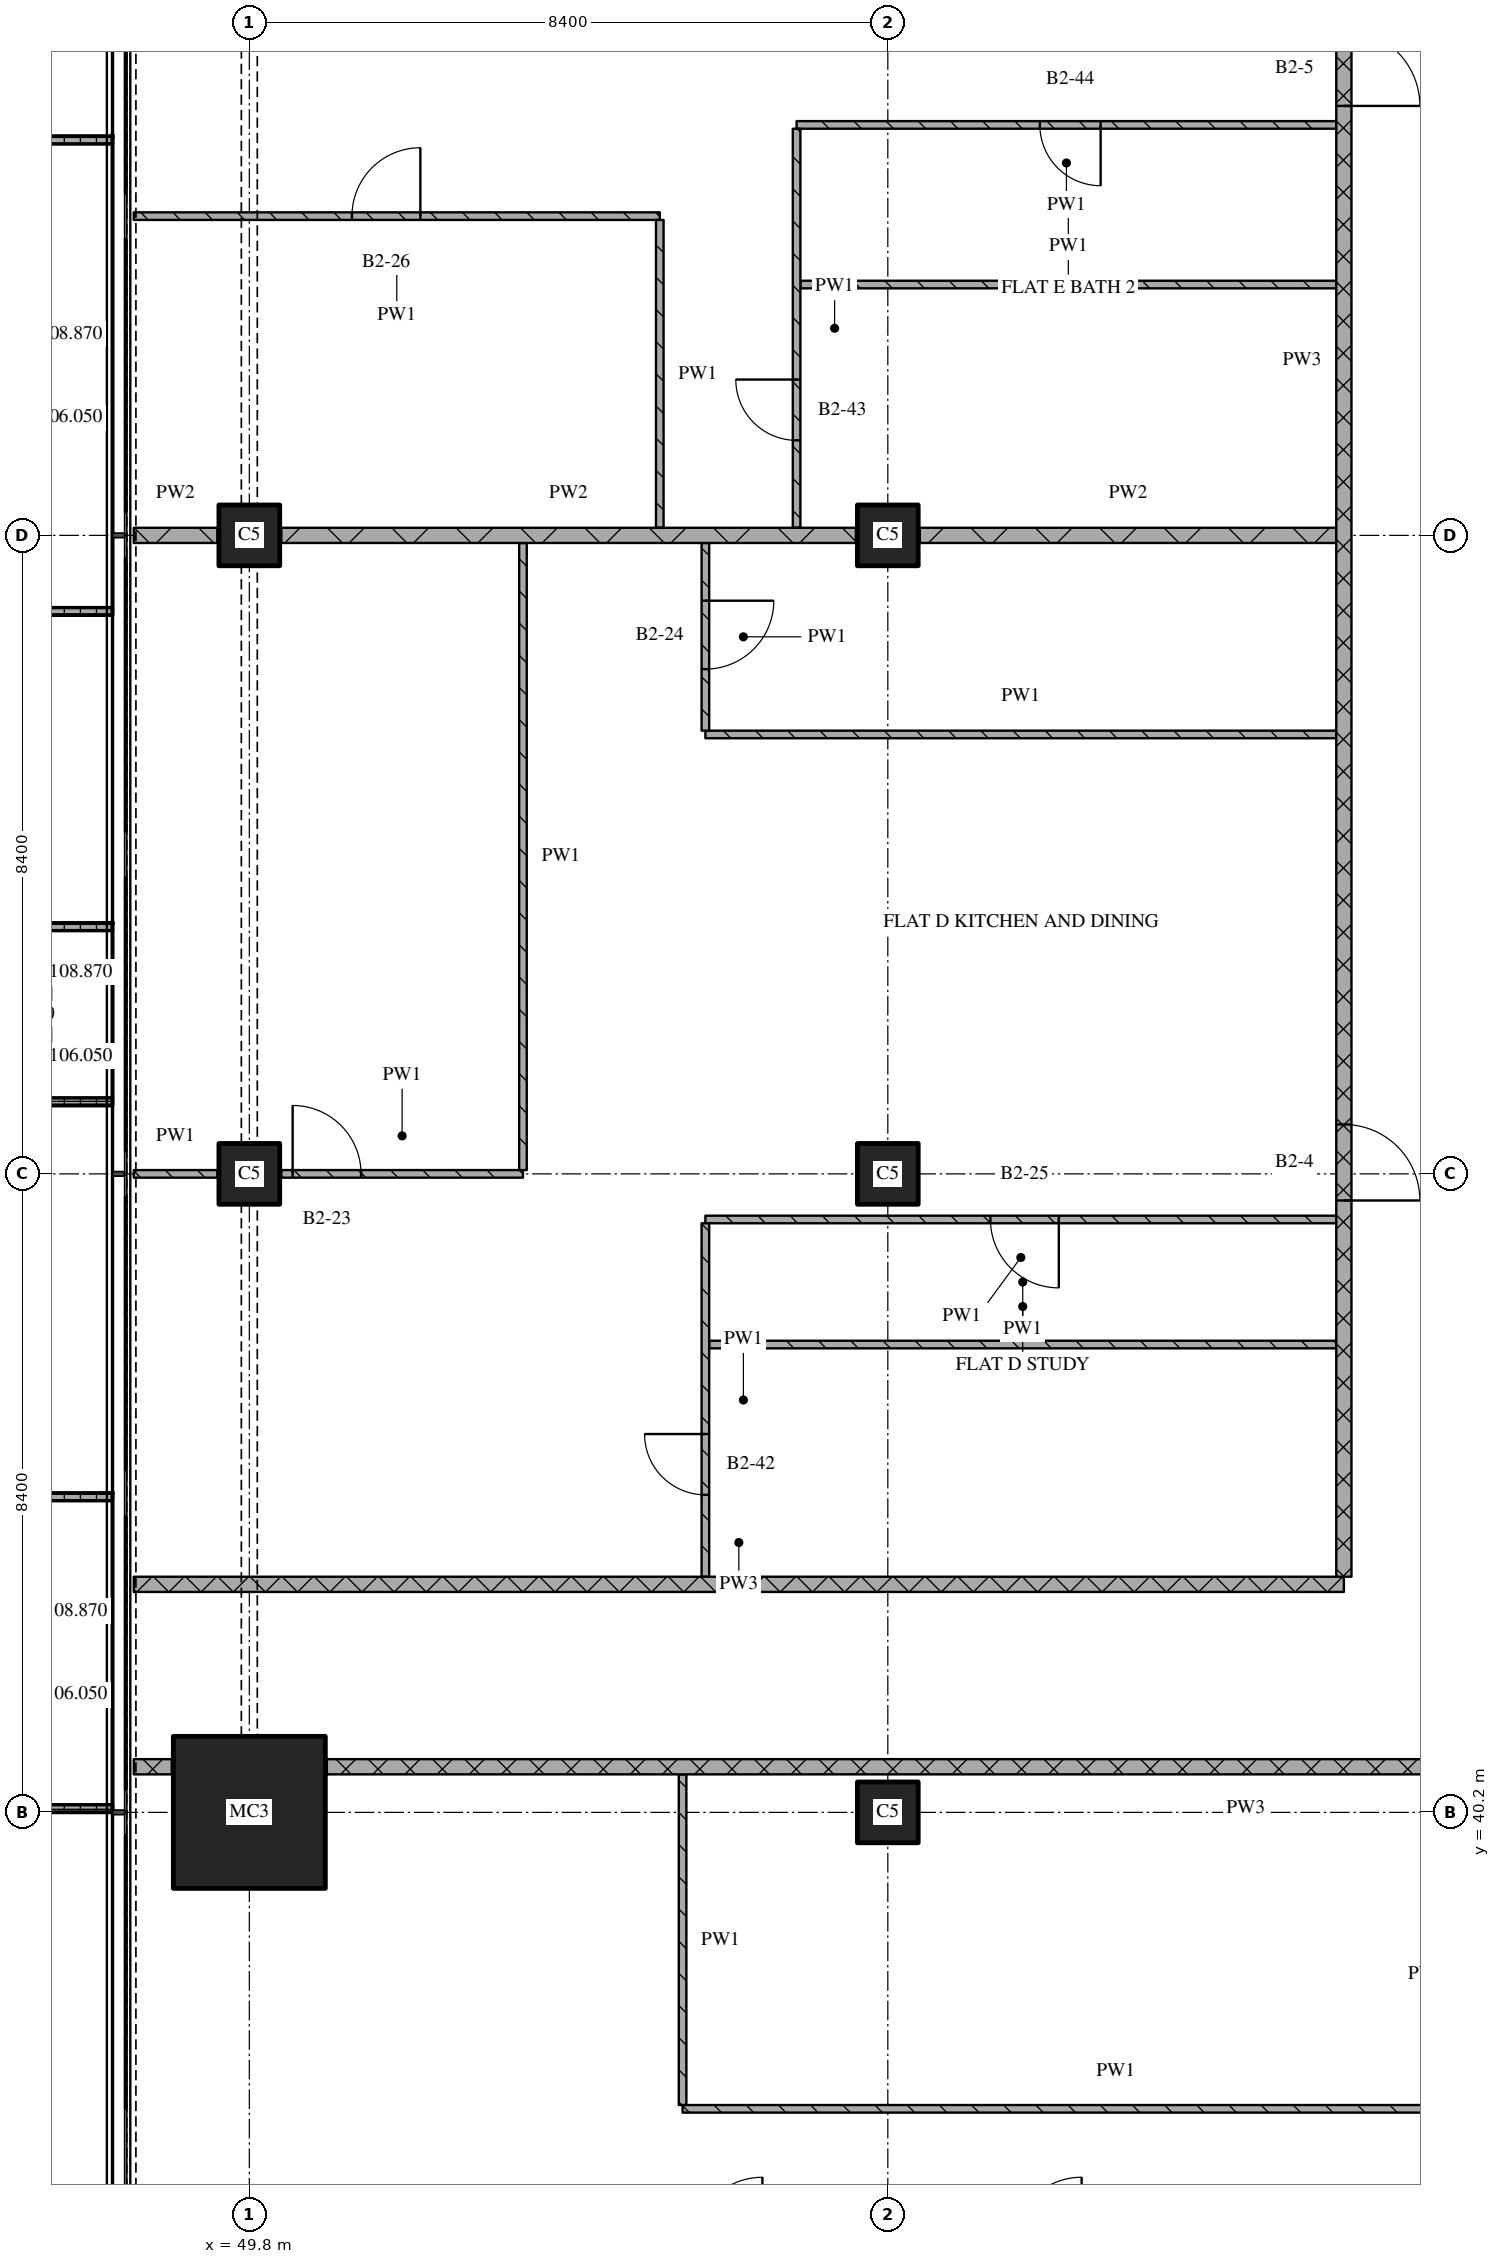
"""IFC4 building model, lengths in metres.
Left out: names, types, materials, properties, quantities, classifications, styles, units other than length and angle.
Written with IfcOpenShell. Run it as: python <this file> out.ifc"""

import sys

from ifc_helpers import new_model, si_unit, direction, frame, frame_2d, origin, origin_2d, place, context, subcontext, project, spatial, polyline, rectangle, outline, extrude, element, fill, save


model = new_model("IFC4")
c1 = context("Model", 3, precision=1e-05, world=origin(), true_north=direction((0.0, 1.0)))
c2 = subcontext(c1, "Body", "Model", "MODEL_VIEW")
j1 = project(units=[si_unit("LENGTHUNIT", "METRE"), si_unit("PLANEANGLEUNIT", "RADIAN")], contexts=[c1])
p1 = place(None, origin())
s1 = spatial("IfcSite", under=j1, at=p1, CompositionType="ELEMENT")
p2 = place(p1, origin())
s2 = spatial("IfcBuilding", under=s1, at=p2, CompositionType="ELEMENT")
p3 = place(p2, frame((0.0, 0.0, 106.05)))
s3 = spatial("IfcBuildingStorey", under=s2, at=p3, CompositionType="ELEMENT", Elevation=106.05)
p4 = place(p3, frame((49.8, 40.2, 0.0), z_axis=(0.0, 0.0, 1.0), x_axis=(1.0, 0.0, 0.0)))
e1 = element("IfcColumn", 1, at=p4, inside=s3, PredefinedType="COLUMN", context=c2, shape_type="SweptSolid", body=[
    extrude(rectangle(XDim=2.0, YDim=2.0, at=origin_2d()), origin(), (0.0, 0.0, 1.0), 3.6),
])
for number, where, z_axis, x_axis in (
    (2, (49.8, 48.6, 0.0), (0.0, 0.0, 1.0), (1.0, 0.0, 0.0)),
    (3, (49.8, 57.0, 0.0), (0.0, 0.0, 1.0), (1.0, 0.0, 0.0)),
    (4, (58.2, 40.2, 0.0), (0.0, 0.0, 1.0), (1.0, 0.0, 0.0)),
    (5, (58.2, 48.6, 0.0), (0.0, 0.0, 1.0), (1.0, 0.0, 0.0)),
    (6, (58.2, 57.0, 0.0), (0.0, 0.0, 1.0), (1.0, 0.0, 0.0)),
):
    element("IfcColumn", number, at=place(p3, frame(where, z_axis=z_axis, x_axis=x_axis)), inside=s3, PredefinedType="COLUMN", context=c2, shape_type="SweptSolid", body=[
        extrude(rectangle(XDim=0.8, YDim=0.8, at=origin_2d()), origin(), (0.0, 0.0, 1.0), 3.6),
    ])
p5 = place(p3, origin())
e7 = element("IfcWall", 7, at=p5, inside=s3, PredefinedType="SOLIDWALL", context=c2, shape_type="SweptSolid", body=[
    extrude(outline(polyline([(48.0, 62.25), (48.0, 62.15), (46.233, 62.15), (46.233, 56.05), (48.0, 56.05), (48.0, 55.95), (46.133, 55.95), (46.133, 62.25), (48.0, 62.25)])), origin(), (0.0, 0.0, 1.0), 1.0),
])
p6 = place(p3, origin())
e8 = element("IfcWall", 8, at=p6, inside=s3, PredefinedType="SOLIDWALL", context=c2, shape_type="SweptSolid", body=[
    extrude(outline(polyline([(48.0, 51.9), (48.0, 51.8), (46.5, 51.8), (46.5, 49.6), (48.0, 49.6), (48.0, 49.5), (46.4, 49.5), (46.4, 51.9), (48.0, 51.9)])), origin(), (0.0, 0.0, 1.0), 1.0),
])
p7 = place(p3, origin())
e9 = element("IfcWall", 9, at=p7, inside=s3, PredefinedType="SOLIDWALL", context=c2, shape_type="SweptSolid", body=[
    extrude(outline(polyline([(48.0, 44.4), (48.0, 44.3), (46.367, 44.3), (46.367, 40.3), (48.0, 40.3), (48.0, 40.2), (46.267, 40.2), (46.267, 44.4), (48.0, 44.4)])), origin(), (0.0, 0.0, 1.0), 1.0),
])
p8 = place(p3, frame((55.5, 36.3, 0.0), z_axis=(0.0, 0.0, 1.0), x_axis=(1.0, 0.0, 0.0)))
e10 = element("IfcWall", 10, at=p8, inside=s3, PredefinedType="PARTITIONING", context=c2, shape_type="SweptSolid", body=[
    extrude(rectangle(XDim=11.4, YDim=0.1, at=frame_2d((5.7, 0.0))), origin(), (0.0, 0.0, 1.0), 3.32),
])
p9 = place(p3, frame((48.28, 40.8, 0.0), z_axis=(0.0, 0.0, 1.0), x_axis=(1.0, 0.0, 0.0)))
e11 = element("IfcWall", 11, at=p9, inside=s3, PredefinedType="PARTITIONING", context=c2, shape_type="SweptSolid", body=[
    extrude(rectangle(XDim=0.5, YDim=0.2, at=frame_2d((0.25, 0.0))), origin(), (0.0, 0.0, 1.0), 3.32),
])
p10 = place(p3, frame((75.0, 40.8, 0.0), z_axis=(0.0, 0.0, 1.0), x_axis=(-1.0, 0.0, 0.0)))
e12 = element("IfcWall", 12, at=p10, inside=s3, PredefinedType="PARTITIONING", context=c2, shape_type="SweptSolid", body=[
    extrude(rectangle(XDim=24.18, YDim=0.2, at=frame_2d((12.09, 0.0))), origin(), (0.0, 0.0, 1.0), 3.32),
])
p11 = place(p10, frame((6.85, 0.0, 0.0)))
e13 = element("IfcOpeningElement", 13, at=p11, cuts=e12, PredefinedType="OPENING", context=c2, shape_type="SweptSolid", body=[
    extrude(rectangle(XDim=1.0, YDim=2.1, at=frame_2d((0.5, 1.05))), frame((0.0, 0.11, 0.0), z_axis=(0.0, -1.0, 0.0), x_axis=(1.0, 0.0, 0.0)), (0.0, 0.0, 1.0), 0.22),
])
p12 = place(p3, frame((48.28, 43.2, 0.0), z_axis=(0.0, 0.0, 1.0), x_axis=(1.0, 0.0, 0.0)))
e14 = element("IfcWall", 14, at=p12, inside=s3, PredefinedType="PARTITIONING", context=c2, shape_type="SweptSolid", body=[
    extrude(rectangle(XDim=15.92, YDim=0.2, at=frame_2d((7.96, 0.0))), origin(), (0.0, 0.0, 1.0), 3.32),
])
p13 = place(p3, frame((55.85, 46.355, 0.0), z_axis=(0.0, 0.0, 1.0), x_axis=(1.0, 0.0, 0.0)))
e15 = element("IfcWall", 15, at=p13, inside=s3, PredefinedType="PARTITIONING", context=c2, shape_type="SweptSolid", body=[
    extrude(rectangle(XDim=8.25, YDim=0.1, at=frame_2d((4.125, 0.0))), origin(), (0.0, 0.0, 1.0), 3.32),
])
p14 = place(p3, frame((64.1, 48.0, 0.0), z_axis=(0.0, 0.0, 1.0), x_axis=(-1.0, 0.0, 0.0)))
e16 = element("IfcWall", 16, at=p14, inside=s3, PredefinedType="PARTITIONING", context=c2, shape_type="SweptSolid", body=[
    extrude(rectangle(XDim=8.3, YDim=0.1, at=frame_2d((4.15, 0.0))), origin(), (0.0, 0.0, 1.0), 3.32),
])
p15 = place(p14, frame((3.65, 0.0, 0.0)))
e17 = element("IfcOpeningElement", 17, at=p15, cuts=e16, PredefinedType="OPENING", context=c2, shape_type="SweptSolid", body=[
    extrude(rectangle(XDim=0.9, YDim=2.1, at=frame_2d((0.45, 1.05))), frame((0.0, 0.06, 0.0), z_axis=(0.0, -1.0, 0.0), x_axis=(1.0, 0.0, 0.0)), (0.0, 0.0, 1.0), 0.12),
])
p16 = place(p3, frame((48.28, 48.6, 0.0), z_axis=(0.0, 0.0, 1.0), x_axis=(1.0, 0.0, 0.0)))
e18 = element("IfcWall", 18, at=p16, inside=s3, PredefinedType="PARTITIONING", context=c2, shape_type="SweptSolid", body=[
    extrude(rectangle(XDim=1.1, YDim=0.1, at=frame_2d((0.55, 0.0))), origin(), (0.0, 0.0, 1.0), 3.32),
])
p17 = place(p3, frame((50.22, 48.6, 0.0), z_axis=(0.0, 0.0, 1.0), x_axis=(1.0, 0.0, 0.0)))
e19 = element("IfcWall", 19, at=p17, inside=s3, PredefinedType="PARTITIONING", context=c2, shape_type="SweptSolid", body=[
    extrude(rectangle(XDim=3.18, YDim=0.1, at=frame_2d((1.59, 0.0))), origin(), (0.0, 0.0, 1.0), 3.32),
])
p18 = place(p17, frame((0.15, 0.0, 0.0)))
e20 = element("IfcOpeningElement", 20, at=p18, cuts=e19, PredefinedType="OPENING", context=c2, shape_type="SweptSolid", body=[
    extrude(rectangle(XDim=0.9, YDim=2.1, at=frame_2d((0.45, 1.05))), frame((0.0, 0.06, 0.0), z_axis=(0.0, -1.0, 0.0), x_axis=(1.0, 0.0, 0.0)), (0.0, 0.0, 1.0), 0.12),
])
p19 = place(p3, frame((55.8, 54.381, 0.0), z_axis=(0.0, 0.0, 1.0), x_axis=(1.0, 0.0, 0.0)))
e21 = element("IfcWall", 21, at=p19, inside=s3, PredefinedType="PARTITIONING", context=c2, shape_type="SweptSolid", body=[
    extrude(rectangle(XDim=8.3, YDim=0.1, at=frame_2d((4.15, 0.0))), origin(), (0.0, 0.0, 1.0), 3.32),
])
p20 = place(p3, frame((48.28, 57.0, 0.0), z_axis=(0.0, 0.0, 1.0), x_axis=(1.0, 0.0, 0.0)))
e22 = element("IfcWall", 22, at=p20, inside=s3, PredefinedType="PARTITIONING", context=c2, shape_type="SweptSolid", body=[
    extrude(rectangle(XDim=1.1, YDim=0.2, at=frame_2d((0.55, 0.0))), origin(), (0.0, 0.0, 1.0), 3.32),
])
p21 = place(p3, frame((50.22, 57.0, 0.0), z_axis=(0.0, 0.0, 1.0), x_axis=(1.0, 0.0, 0.0)))
e23 = element("IfcWall", 23, at=p21, inside=s3, PredefinedType="PARTITIONING", context=c2, shape_type="SweptSolid", body=[
    extrude(rectangle(XDim=7.56, YDim=0.2, at=frame_2d((3.78, 0.0))), origin(), (0.0, 0.0, 1.0), 3.32),
])
p22 = place(p3, frame((58.62, 57.0, 0.0), z_axis=(0.0, 0.0, 1.0), x_axis=(1.0, 0.0, 0.0)))
e24 = element("IfcWall", 24, at=p22, inside=s3, PredefinedType="PARTITIONING", context=c2, shape_type="SweptSolid", body=[
    extrude(rectangle(XDim=5.48, YDim=0.2, at=frame_2d((2.74, 0.0))), origin(), (0.0, 0.0, 1.0), 3.32),
])
p23 = place(p3, frame((57.05, 60.3, 0.0), z_axis=(0.0, 0.0, 1.0), x_axis=(1.0, 0.0, 0.0)))
e25 = element("IfcWall", 25, at=p23, inside=s3, PredefinedType="PARTITIONING", context=c2, shape_type="SweptSolid", body=[
    extrude(rectangle(XDim=7.05, YDim=0.1, at=frame_2d((3.525, 0.0))), origin(), (0.0, 0.0, 1.0), 3.32),
])
p24 = place(p3, frame((55.2, 61.2, 0.0), z_axis=(0.0, 0.0, 1.0), x_axis=(-1.0, 0.0, 0.0)))
e26 = element("IfcWall", 26, at=p24, inside=s3, PredefinedType="PARTITIONING", context=c2, shape_type="SweptSolid", body=[
    extrude(rectangle(XDim=6.92, YDim=0.1, at=frame_2d((3.46, 0.0))), origin(), (0.0, 0.0, 1.0), 3.32),
])
p25 = place(p24, frame((3.15, 0.0, 0.0)))
e27 = element("IfcOpeningElement", 27, at=p25, cuts=e26, PredefinedType="OPENING", context=c2, shape_type="SweptSolid", body=[
    extrude(rectangle(XDim=0.9, YDim=2.1, at=frame_2d((0.45, 1.05))), frame((0.0, 0.06, 0.0), z_axis=(0.0, -1.0, 0.0), x_axis=(1.0, 0.0, 0.0)), (0.0, 0.0, 1.0), 0.12),
])
p26 = place(p3, frame((64.1, 62.4, 0.0), z_axis=(0.0, 0.0, 1.0), x_axis=(-1.0, 0.0, 0.0)))
e28 = element("IfcWall", 28, at=p26, inside=s3, PredefinedType="PARTITIONING", context=c2, shape_type="SweptSolid", body=[
    extrude(rectangle(XDim=7.1, YDim=0.1, at=frame_2d((3.55, 0.0))), origin(), (0.0, 0.0, 1.0), 3.32),
])
p27 = place(p26, frame((3.1, 0.0, 0.0)))
e29 = element("IfcOpeningElement", 29, at=p27, cuts=e28, PredefinedType="OPENING", context=c2, shape_type="SweptSolid", body=[
    extrude(rectangle(XDim=0.8, YDim=2.1, at=frame_2d((0.4, 1.05))), frame((0.0, 0.06, 0.0), z_axis=(0.0, -1.0, 0.0), x_axis=(1.0, 0.0, 0.0)), (0.0, 0.0, 1.0), 0.12),
])
p28 = place(p3, frame((53.4, 56.9, 0.0), z_axis=(0.0, 0.0, 1.0), x_axis=(0.0, -1.0, 0.0)))
e30 = element("IfcWall", 30, at=p28, inside=s3, PredefinedType="PARTITIONING", context=c2, shape_type="SweptSolid", body=[
    extrude(rectangle(XDim=8.25, YDim=0.1, at=frame_2d((4.125, 0.0))), origin(), (0.0, 0.0, 1.0), 3.32),
])
p29 = place(p3, frame((55.2, 61.15, 0.0), z_axis=(0.0, 0.0, 1.0), x_axis=(0.0, -1.0, 0.0)))
e31 = element("IfcWall", 31, at=p29, inside=s3, PredefinedType="PARTITIONING", context=c2, shape_type="SweptSolid", body=[
    extrude(rectangle(XDim=4.05, YDim=0.1, at=frame_2d((2.025, 0.0))), origin(), (0.0, 0.0, 1.0), 3.32),
])
p30 = place(p3, frame((55.5, 40.7, 0.0), z_axis=(0.0, 0.0, 1.0), x_axis=(0.0, -1.0, 0.0)))
e32 = element("IfcWall", 32, at=p30, inside=s3, PredefinedType="PARTITIONING", context=c2, shape_type="SweptSolid", body=[
    extrude(rectangle(XDim=4.35, YDim=0.1, at=frame_2d((2.175, 0.0))), origin(), (0.0, 0.0, 1.0), 3.32),
])
p31 = place(p3, frame((55.8, 47.95, 0.0), z_axis=(0.0, 0.0, 1.0), x_axis=(0.0, -1.0, 0.0)))
e33 = element("IfcWall", 33, at=p31, inside=s3, PredefinedType="PARTITIONING", context=c2, shape_type="SweptSolid", body=[
    extrude(rectangle(XDim=4.65, YDim=0.1, at=frame_2d((2.325, 0.0))), origin(), (0.0, 0.0, 1.0), 3.32),
])
p32 = place(p31, frame((2.773, 0.0, 0.0)))
e34 = element("IfcOpeningElement", 34, at=p32, cuts=e33, PredefinedType="OPENING", context=c2, shape_type="SweptSolid", body=[
    extrude(rectangle(XDim=0.8, YDim=2.1, at=frame_2d((0.4, 1.05))), frame((0.0, 0.06, 0.0), z_axis=(0.0, -1.0, 0.0), x_axis=(1.0, 0.0, 0.0)), (0.0, 0.0, 1.0), 0.12),
])
p33 = place(p3, frame((55.8, 56.9, 0.0), z_axis=(0.0, 0.0, 1.0), x_axis=(0.0, -1.0, 0.0)))
e35 = element("IfcWall", 35, at=p33, inside=s3, PredefinedType="PARTITIONING", context=c2, shape_type="SweptSolid", body=[
    extrude(rectangle(XDim=2.469, YDim=0.1, at=frame_2d((1.234, 0.0))), origin(), (0.0, 0.0, 1.0), 3.32),
])
p34 = place(p33, frame((0.76, 0.0, 0.0)))
e36 = element("IfcOpeningElement", 36, at=p34, cuts=e35, PredefinedType="OPENING", context=c2, shape_type="SweptSolid", body=[
    extrude(rectangle(XDim=0.9, YDim=2.1, at=frame_2d((0.45, 1.05))), frame((0.0, 0.06, 0.0), z_axis=(0.0, -1.0, 0.0), x_axis=(1.0, 0.0, 0.0)), (0.0, 0.0, 1.0), 0.12),
])
p35 = place(p3, frame((57.0, 62.35, 0.0), z_axis=(0.0, 0.0, 1.0), x_axis=(0.0, -1.0, 0.0)))
e37 = element("IfcWall", 37, at=p35, inside=s3, PredefinedType="PARTITIONING", context=c2, shape_type="SweptSolid", body=[
    extrude(rectangle(XDim=5.25, YDim=0.1, at=frame_2d((2.625, 0.0))), origin(), (0.0, 0.0, 1.0), 3.32),
])
p36 = place(p35, frame((3.3, 0.0, 0.0)))
e38 = element("IfcOpeningElement", 38, at=p36, cuts=e37, PredefinedType="OPENING", context=c2, shape_type="SweptSolid", body=[
    extrude(rectangle(XDim=0.8, YDim=2.1, at=frame_2d((0.4, 1.05))), frame((0.0, 0.06, 0.0), z_axis=(0.0, -1.0, 0.0), x_axis=(1.0, 0.0, 0.0)), (0.0, 0.0, 1.0), 0.12),
])
p37 = place(p3, frame((64.2, 43.3, 0.0), z_axis=(0.0, 0.0, 1.0), x_axis=(0.0, 1.0, 0.0)))
e39 = element("IfcWall", 39, at=p37, inside=s3, PredefinedType="PARTITIONING", context=c2, shape_type="SweptSolid", body=[
    extrude(rectangle(XDim=32.02, YDim=0.2, at=frame_2d((16.01, 0.0))), origin(), (0.0, 0.0, 1.0), 3.32),
])
p38 = place(p37, frame((4.95, 0.0, 0.0)))
e40 = element("IfcOpeningElement", 40, at=p38, cuts=e39, PredefinedType="OPENING", context=c2, shape_type="SweptSolid", body=[
    extrude(rectangle(XDim=1.0, YDim=2.1, at=frame_2d((0.5, 1.05))), frame((0.0, 0.11, 0.0), z_axis=(0.0, -1.0, 0.0), x_axis=(1.0, 0.0, 0.0)), (0.0, 0.0, 1.0), 0.22),
])
p39 = place(p37, frame((19.35, 0.0, 0.0)))
e41 = element("IfcOpeningElement", 41, at=p39, cuts=e39, PredefinedType="OPENING", context=c2, shape_type="SweptSolid", body=[
    extrude(rectangle(XDim=1.0, YDim=2.1, at=frame_2d((0.5, 1.05))), frame((0.0, 0.11, 0.0), z_axis=(0.0, -1.0, 0.0), x_axis=(1.0, 0.0, 0.0)), (0.0, 0.0, 1.0), 0.22),
])
p40 = place(p15, origin())
e42 = element("IfcDoor", 42, at=p40, inside=s3, OperationType="SINGLE_SWING_LEFT", PredefinedType="DOOR", context=c2, shape_type="SweptSolid", body=[
    extrude(rectangle(XDim=0.9, YDim=2.1, at=frame_2d((0.45, 1.05))), frame((0.0, 0.025, 0.0), z_axis=(0.0, -1.0, 0.0), x_axis=(1.0, 0.0, 0.0)), (0.0, 0.0, 1.0), 0.05),
])
fill(e17, e42)
p41 = place(p18, origin())
e43 = element("IfcDoor", 43, at=p41, inside=s3, OperationType="SINGLE_SWING_LEFT", PredefinedType="DOOR", context=c2, shape_type="SweptSolid", body=[
    extrude(rectangle(XDim=0.9, YDim=2.1, at=frame_2d((0.45, 1.05))), frame((0.0, 0.025, 0.0), z_axis=(0.0, -1.0, 0.0), x_axis=(1.0, 0.0, 0.0)), (0.0, 0.0, 1.0), 0.05),
])
fill(e20, e43)
p42 = place(p25, origin())
e44 = element("IfcDoor", 44, at=p42, inside=s3, OperationType="SINGLE_SWING_RIGHT", PredefinedType="DOOR", context=c2, shape_type="SweptSolid", body=[
    extrude(rectangle(XDim=0.9, YDim=2.1, at=frame_2d((0.45, 1.05))), frame((0.0, 0.025, 0.0), z_axis=(0.0, -1.0, 0.0), x_axis=(1.0, 0.0, 0.0)), (0.0, 0.0, 1.0), 0.05),
])
fill(e27, e44)
p43 = place(p27, origin())
e45 = element("IfcDoor", 45, at=p43, inside=s3, OperationType="SINGLE_SWING_LEFT", PredefinedType="DOOR", context=c2, shape_type="SweptSolid", body=[
    extrude(rectangle(XDim=0.8, YDim=2.1, at=frame_2d((0.4, 1.05))), frame((0.0, 0.025, 0.0), z_axis=(0.0, -1.0, 0.0), x_axis=(1.0, 0.0, 0.0)), (0.0, 0.0, 1.0), 0.05),
])
fill(e29, e45)
p44 = place(p32, origin())
e46 = element("IfcDoor", 46, at=p44, inside=s3, OperationType="SINGLE_SWING_RIGHT", PredefinedType="DOOR", context=c2, shape_type="SweptSolid", body=[
    extrude(rectangle(XDim=0.8, YDim=2.1, at=frame_2d((0.4, 1.05))), frame((0.0, 0.025, 0.0), z_axis=(0.0, -1.0, 0.0), x_axis=(1.0, 0.0, 0.0)), (0.0, 0.0, 1.0), 0.05),
])
fill(e34, e46)
p45 = place(p34, origin())
e47 = element("IfcDoor", 47, at=p45, inside=s3, OperationType="SINGLE_SWING_LEFT", PredefinedType="DOOR", context=c2, shape_type="SweptSolid", body=[
    extrude(rectangle(XDim=0.9, YDim=2.1, at=frame_2d((0.45, 1.05))), frame((0.0, 0.025, 0.0), z_axis=(0.0, -1.0, 0.0), x_axis=(1.0, 0.0, 0.0)), (0.0, 0.0, 1.0), 0.05),
])
fill(e36, e47)
p46 = place(p36, origin())
e48 = element("IfcDoor", 48, at=p46, inside=s3, OperationType="SINGLE_SWING_RIGHT", PredefinedType="DOOR", context=c2, shape_type="SweptSolid", body=[
    extrude(rectangle(XDim=0.8, YDim=2.1, at=frame_2d((0.4, 1.05))), frame((0.0, 0.025, 0.0), z_axis=(0.0, -1.0, 0.0), x_axis=(1.0, 0.0, 0.0)), (0.0, 0.0, 1.0), 0.05),
])
fill(e38, e48)
p47 = place(p38, origin())
e49 = element("IfcDoor", 49, at=p47, inside=s3, OperationType="SINGLE_SWING_RIGHT", PredefinedType="DOOR", context=c2, shape_type="SweptSolid", body=[
    extrude(rectangle(XDim=1.0, YDim=2.1, at=frame_2d((0.5, 1.05))), frame((0.0, 0.025, 0.0), z_axis=(0.0, -1.0, 0.0), x_axis=(1.0, 0.0, 0.0)), (0.0, 0.0, 1.0), 0.05),
])
fill(e40, e49)
p48 = place(p39, origin())
e50 = element("IfcDoor", 50, at=p48, inside=s3, OperationType="SINGLE_SWING_RIGHT", PredefinedType="DOOR", context=c2, shape_type="SweptSolid", body=[
    extrude(rectangle(XDim=1.0, YDim=2.1, at=frame_2d((0.5, 1.05))), frame((0.0, 0.025, 0.0), z_axis=(0.0, -1.0, 0.0), x_axis=(1.0, 0.0, 0.0)), (0.0, 0.0, 1.0), 0.05),
])
fill(e41, e50)
save(model, sys.argv[1])
